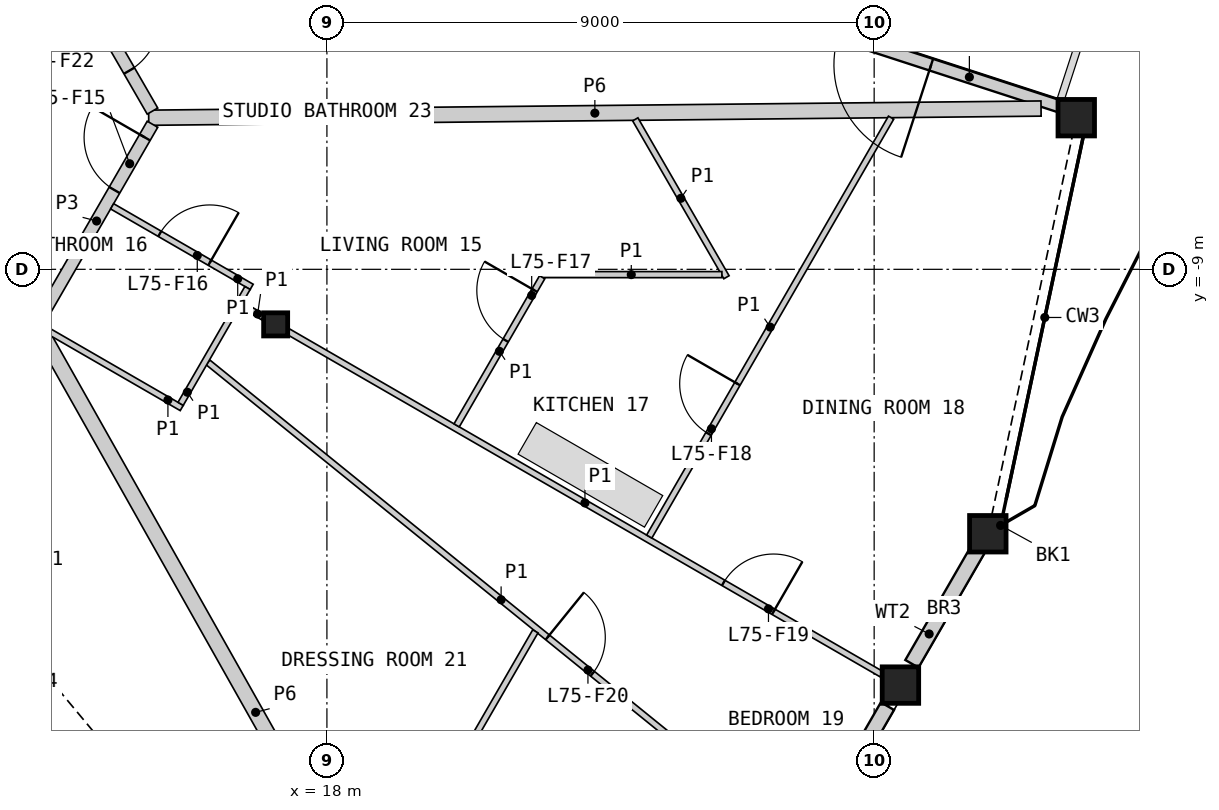
"""IFC4 building model, lengths in metres.
Left out: names, types, materials, properties, quantities, classifications, styles, units other than length and angle.
Written with IfcOpenShell. Run it as: python <this file> out.ifc"""

import sys

from ifc_helpers import new_model, si_unit, direction, frame, frame_2d, origin, origin_2d, place, context, subcontext, project, spatial, rectangle, hollow_rectangle, i_section, extrude, element, fill, save


model = new_model("IFC4")
c1 = context("Model", 3, precision=1e-05, world=origin(), true_north=direction((0.0, 1.0)))
c2 = subcontext(c1, "Body", "Model", "MODEL_VIEW")
j1 = project(units=[si_unit("LENGTHUNIT", "METRE"), si_unit("PLANEANGLEUNIT", "RADIAN")], contexts=[c1])
p1 = place(None, origin())
s1 = spatial("IfcSite", under=j1, at=p1, CompositionType="ELEMENT")
p2 = place(p1, origin())
s2 = spatial("IfcBuilding", under=s1, at=p2, CompositionType="ELEMENT")
p3 = place(p2, frame((0.0, 0.0, 335.8)))
s3 = spatial("IfcBuildingStorey", under=s2, at=p3, CompositionType="ELEMENT", Elevation=335.8)
for number, where, z_axis, x_axis in (
    (1, (27.432, -15.838, 0.0), (0.0, 0.0, 1.0), (1.0, 0.0, 0.0)),
    (2, (28.869, -13.349, 0.0), (0.0, 0.0, 1.0), (1.0, 0.0, 0.0)),
    (3, (30.324, -6.506, 0.0), (0.0, 0.0, 1.0), (1.0, 0.0, 0.0)),
):
    element("IfcColumn", number, at=place(p3, frame(where, z_axis=z_axis, x_axis=x_axis)), inside=s3, PredefinedType="COLUMN", context=c2, shape_type="SweptSolid", body=[
        extrude(hollow_rectangle(XDim=0.6, YDim=0.6, WallThickness=0.04, at=origin_2d()), origin(), (0.0, 0.0, 1.0), 3.4),
    ])
p4 = place(p3, frame((17.157, -9.906, 0.0), z_axis=(0.0, 0.0, 1.0), x_axis=(1.0, 0.0, 0.0)))
e4 = element("IfcColumn", 4, at=p4, inside=s3, PredefinedType="COLUMN", context=c2, shape_type="SweptSolid", body=[
    extrude(i_section(OverallWidth=0.396, OverallDepth=0.381, WebThickness=0.019, FlangeThickness=0.03, at=origin_2d()), origin(), (0.0, 0.0, 1.0), 3.4),
])
p5 = place(p3, frame((26.09, -18.139, 0.0), z_axis=(0.0, 0.0, 1.0), x_axis=(0.500046963369, 0.865998287773, 0.0)))
e5 = element("IfcWall", 5, at=p5, inside=s3, PredefinedType="SOLIDWALL", context=c2, shape_type="SweptSolid", body=[
    extrude(rectangle(XDim=2.258, YDim=0.25, at=frame_2d((1.129, 0.0))), origin(), (0.0, 0.0, 1.0), 2.488),
])
p6 = place(p5, frame((0.45, 0.0, 1.6)))
e6 = element("IfcOpeningElement", 6, at=p6, cuts=e5, PredefinedType="OPENING", context=c2, shape_type="SweptSolid", body=[
    extrude(rectangle(XDim=0.9, YDim=0.6, at=frame_2d((0.45, 0.3))), frame((0.0, 0.135, 0.0), z_axis=(0.0, -1.0, 0.0), x_axis=(1.0, 0.0, 0.0)), (0.0, 0.0, 1.0), 0.27),
])
p7 = place(p3, frame((27.621, -15.488, 0.0), z_axis=(0.0, 0.0, 1.0), x_axis=(0.49996174997, 0.866047486323, 0.0)))
e7 = element("IfcWall", 7, at=p7, inside=s3, PredefinedType="SOLIDWALL", context=c2, shape_type="SweptSolid", body=[
    extrude(rectangle(XDim=2.267, YDim=0.25, at=frame_2d((1.133, 0.0))), origin(), (0.0, 0.0, 1.0), 2.488),
])
p8 = place(p3, frame((30.09, -6.333, 0.0), z_axis=(0.0, 0.0, 1.0), x_axis=(-0.951048625867, 0.309041277561, 0.0)))
e8 = element("IfcWall", 8, at=p8, inside=s3, PredefinedType="SOLIDWALL", context=c2, shape_type="SweptSolid", body=[
    extrude(rectangle(XDim=6.408, YDim=0.2, at=frame_2d((3.204, 0.0))), origin(), (0.0, 0.0, 1.0), 2.488),
])
p9 = place(p8, frame((2.262, 0.0, 0.0)))
e9 = element("IfcOpeningElement", 9, at=p9, cuts=e8, PredefinedType="OPENING", context=c2, shape_type="SweptSolid", body=[
    extrude(rectangle(XDim=1.6, YDim=2.25, at=frame_2d((0.8, 1.125))), frame((0.0, 0.11, 0.0), z_axis=(0.0, -1.0, 0.0), x_axis=(1.0, 0.0, 0.0)), (0.0, 0.0, 1.0), 0.22),
])
p10 = place(p3, frame((15.069, -6.507, 0.0), z_axis=(0.0, 0.0, 1.0), x_axis=(0.999946985532, 0.010296898856, 0.0)))
e10 = element("IfcWall", 10, at=p10, inside=s3, PredefinedType="PARTITIONING", context=c2, shape_type="SweptSolid", body=[
    extrude(rectangle(XDim=14.677, YDim=0.25, at=frame_2d((7.338, 0.0))), origin(), (0.0, 0.0, 1.0), 2.33),
])
p11 = place(p3, frame((13.169, -9.797, 0.0), z_axis=(0.0, 0.0, 1.0), x_axis=(0.4910591841, -0.871126212274, 0.0)))
e11 = element("IfcWall", 11, at=p11, inside=s3, PredefinedType="PARTITIONING", context=c2, shape_type="SweptSolid", body=[
    extrude(rectangle(XDim=14.9, YDim=0.25, at=frame_2d((7.45, 0.0))), origin(), (0.0, 0.0, 1.0), 2.33),
])
p12 = place(p3, frame((12.988, -2.684, 0.0), z_axis=(0.0, 0.0, 1.0), x_axis=(0.500003406062, -0.866023437285, 0.0)))
e12 = element("IfcWall", 12, at=p12, inside=s3, PredefinedType="PARTITIONING", context=c2, shape_type="SweptSolid", body=[
    extrude(rectangle(XDim=4.288, YDim=0.2, at=frame_2d((2.144, 0.0))), origin(), (0.0, 0.0, 1.0), 3.1),
])
p13 = place(p12, frame((2.521, 0.0, 0.0)))
e13 = element("IfcOpeningElement", 13, at=p13, cuts=e12, PredefinedType="OPENING", context=c2, shape_type="SweptSolid", body=[
    extrude(rectangle(XDim=1.0, YDim=2.1, at=frame_2d((0.5, 1.05))), frame((0.0, 0.11, 0.0), z_axis=(0.0, -1.0, 0.0), x_axis=(1.0, 0.0, 0.0)), (0.0, 0.0, 1.0), 0.22),
])
p14 = place(p3, frame((13.293, -9.797, 0.0), z_axis=(0.0, 0.0, 1.0), x_axis=(0.499967746641, 0.866044024469, 0.0)))
e14 = element("IfcWall", 14, at=p14, inside=s3, PredefinedType="PARTITIONING", context=c2, shape_type="SweptSolid", body=[
    extrude(rectangle(XDim=3.676, YDim=0.2, at=frame_2d((1.838, 0.0))), origin(), (0.0, 0.0, 1.0), 3.1),
])
p15 = place(p14, frame((2.426, 0.0, 0.0)))
e15 = element("IfcOpeningElement", 15, at=p15, cuts=e14, PredefinedType="OPENING", context=c2, shape_type="SweptSolid", body=[
    extrude(rectangle(XDim=1.0, YDim=2.1, at=frame_2d((0.5, 1.05))), frame((0.0, 0.11, 0.0), z_axis=(0.0, -1.0, 0.0), x_axis=(1.0, 0.0, 0.0)), (0.0, 0.0, 1.0), 0.22),
])
p16 = place(p3, frame((16.044, -10.531, 0.0), z_axis=(0.0, 0.0, 1.0), x_axis=(0.777141742697, -0.629325600749, 0.0)))
e16 = element("IfcWall", 16, at=p16, inside=s3, PredefinedType="PARTITIONING", context=c2, shape_type="SweptSolid", body=[
    extrude(rectangle(XDim=12.406, YDim=0.1, at=frame_2d((6.203, 0.0))), origin(), (0.0, 0.0, 1.0), 2.33),
])
p17 = place(p16, frame((7.185, 0.0, 0.0)))
e17 = element("IfcOpeningElement", 17, at=p17, cuts=e16, PredefinedType="OPENING", context=c2, shape_type="SweptSolid", body=[
    extrude(rectangle(XDim=0.95, YDim=2.1, at=frame_2d((0.475, 1.05))), frame((0.0, 0.06, 0.0), z_axis=(0.0, -1.0, 0.0), x_axis=(1.0, 0.0, 0.0)), (0.0, 0.0, 1.0), 0.12),
])
p18 = place(p3, frame((17.365, -10.025, 0.0), z_axis=(0.0, 0.0, 1.0), x_axis=(0.866021046153, -0.500007547564, 0.0)))
e18 = element("IfcWall", 18, at=p18, inside=s3, PredefinedType="PARTITIONING", context=c2, shape_type="SweptSolid", body=[
    extrude(rectangle(XDim=11.267, YDim=0.1, at=frame_2d((5.634, 0.0))), origin(), (0.0, 0.0, 1.0), 2.33),
])
p19 = place(p18, frame((8.264, 0.0, 0.0)))
e19 = element("IfcOpeningElement", 19, at=p19, cuts=e18, PredefinedType="OPENING", context=c2, shape_type="SweptSolid", body=[
    extrude(rectangle(XDim=0.95, YDim=2.1, at=frame_2d((0.475, 1.05))), frame((0.0, 0.06, 0.0), z_axis=(0.0, -1.0, 0.0), x_axis=(1.0, 0.0, 0.0)), (0.0, 0.0, 1.0), 0.12),
])
p20 = place(p3, frame((23.301, -13.395, 0.0), z_axis=(0.0, 0.0, 1.0), x_axis=(0.500017325895, 0.866015400443, 0.0)))
e20 = element("IfcWall", 20, at=p20, inside=s3, PredefinedType="PARTITIONING", context=c2, shape_type="SweptSolid", body=[
    extrude(rectangle(XDim=7.955, YDim=0.1, at=frame_2d((3.978, 0.0))), origin(), (0.0, 0.0, 1.0), 2.33),
])
p21 = place(p20, frame((1.951, 0.0, 0.0)))
e21 = element("IfcOpeningElement", 21, at=p21, cuts=e20, PredefinedType="OPENING", context=c2, shape_type="SweptSolid", body=[
    extrude(rectangle(XDim=0.95, YDim=2.1, at=frame_2d((0.475, 1.05))), frame((0.0, 0.06, 0.0), z_axis=(0.0, -1.0, 0.0), x_axis=(1.0, 0.0, 0.0)), (0.0, 0.0, 1.0), 0.12),
])
p22 = place(p3, frame((18.787, -19.529, 0.0), z_axis=(0.0, 0.0, 1.0), x_axis=(0.499986503906, 0.866033195618, 0.0)))
e22 = element("IfcWall", 22, at=p22, inside=s3, PredefinedType="PARTITIONING", context=c2, shape_type="SweptSolid", body=[
    extrude(rectangle(XDim=5.282, YDim=0.1, at=frame_2d((2.641, 0.0))), origin(), (0.0, 0.0, 1.0), 2.33),
])
p23 = place(p22, frame((1.662, 0.0, 0.0)))
e23 = element("IfcOpeningElement", 23, at=p23, cuts=e22, PredefinedType="OPENING", context=c2, shape_type="SweptSolid", body=[
    extrude(rectangle(XDim=0.95, YDim=2.1, at=frame_2d((0.475, 1.05))), frame((0.0, 0.06, 0.0), z_axis=(0.0, -1.0, 0.0), x_axis=(1.0, 0.0, 0.0)), (0.0, 0.0, 1.0), 0.12),
])
p24 = place(p3, frame((23.072, -6.533, 0.0), z_axis=(0.0, 0.0, 1.0), x_axis=(0.500009026289, -0.866020192391, 0.0)))
e24 = element("IfcWall", 24, at=p24, inside=s3, PredefinedType="PARTITIONING", context=c2, shape_type="SweptSolid", body=[
    extrude(rectangle(XDim=2.999, YDim=0.1, at=frame_2d((1.5, 0.0))), origin(), (0.0, 0.0, 1.0), 2.33),
])
p25 = place(p3, frame((21.515, -9.087, 0.0), z_axis=(0.0, 0.0, 1.0), x_axis=(1.0, 0.0, 0.0)))
e25 = element("IfcWall", 25, at=p25, inside=s3, PredefinedType="PARTITIONING", context=c2, shape_type="SweptSolid", body=[
    extrude(rectangle(XDim=2.981, YDim=0.1, at=frame_2d((1.49, 0.0))), origin(), (0.0, 0.0, 1.0), 2.33),
])
p26 = place(p3, frame((20.134, -11.566, 0.0), z_axis=(0.0, 0.0, 1.0), x_axis=(0.499947857008, 0.866055506462, 0.0)))
e26 = element("IfcWall", 26, at=p26, inside=s3, PredefinedType="PARTITIONING", context=c2, shape_type="SweptSolid", body=[
    extrude(rectangle(XDim=2.813, YDim=0.1, at=frame_2d((1.406, 0.0))), origin(), (0.0, 0.0, 1.0), 2.33),
])
p27 = place(p26, frame((1.613, 0.0, 0.0)))
e27 = element("IfcOpeningElement", 27, at=p27, cuts=e26, PredefinedType="OPENING", context=c2, shape_type="SweptSolid", body=[
    extrude(rectangle(XDim=0.95, YDim=2.1, at=frame_2d((0.475, 1.05))), frame((0.0, 0.06, 0.0), z_axis=(0.0, -1.0, 0.0), x_axis=(1.0, 0.0, 0.0)), (0.0, 0.0, 1.0), 0.12),
])
p28 = place(p3, frame((14.468, -7.964, 0.0), z_axis=(0.0, 0.0, 1.0), x_axis=(0.865989200783, -0.500062700197, 0.0)))
e28 = element("IfcWall", 28, at=p28, inside=s3, PredefinedType="PARTITIONING", context=c2, shape_type="SweptSolid", body=[
    extrude(rectangle(XDim=2.65, YDim=0.1, at=frame_2d((1.325, 0.0))), origin(), (0.0, 0.0, 1.0), 2.33),
])
p29 = place(p28, frame((0.905, 0.0, 0.0)))
e29 = element("IfcOpeningElement", 29, at=p29, cuts=e28, PredefinedType="OPENING", context=c2, shape_type="SweptSolid", body=[
    extrude(rectangle(XDim=0.95, YDim=2.1, at=frame_2d((0.475, 1.05))), frame((0.0, 0.06, 0.0), z_axis=(0.0, -1.0, 0.0), x_axis=(1.0, 0.0, 0.0)), (0.0, 0.0, 1.0), 0.12),
])
p30 = place(p3, frame((13.339, -9.968, 0.0), z_axis=(0.0, 0.0, 1.0), x_axis=(0.866036909293, -0.499980071345, 0.0)))
e30 = element("IfcWall", 30, at=p30, inside=s3, PredefinedType="PARTITIONING", context=c2, shape_type="SweptSolid", body=[
    extrude(rectangle(XDim=2.625, YDim=0.1, at=frame_2d((1.312, 0.0))), origin(), (0.0, 0.0, 1.0), 2.33),
])
p31 = place(p3, frame((15.594, -11.212, 0.0), z_axis=(0.0, 0.0, 1.0), x_axis=(0.499898558967, 0.866083962871, 0.0)))
e31 = element("IfcWall", 31, at=p31, inside=s3, PredefinedType="PARTITIONING", context=c2, shape_type="SweptSolid", body=[
    extrude(rectangle(XDim=2.2, YDim=0.1, at=frame_2d((1.1, 0.0))), origin(), (0.0, 0.0, 1.0), 2.33),
])
p32 = place(p3, frame((16.594, -9.581, 0.0), z_axis=(0.0, 0.0, 1.0), x_axis=(0.866036909293, -0.499980071345, 0.0)))
e32 = element("IfcWall", 32, at=p32, inside=s3, PredefinedType="PARTITIONING", context=c2, shape_type="SweptSolid", body=[
    extrude(rectangle(XDim=0.41, YDim=0.1, at=frame_2d((0.205, 0.0))), origin(), (0.0, 0.0, 1.0), 2.33),
])
p33 = place(p9, origin())
e33 = element("IfcDoor", 33, at=p33, inside=s3, OperationType="DOUBLE_DOOR_SINGLE_SWING", PredefinedType="DOOR", context=c2, shape_type="SweptSolid", body=[
    extrude(rectangle(XDim=1.6, YDim=2.25, at=frame_2d((0.8, 1.125))), frame((0.0, 0.025, 0.0), z_axis=(0.0, -1.0, 0.0), x_axis=(1.0, 0.0, 0.0)), (0.0, 0.0, 1.0), 0.05),
])
fill(e9, e33)
p34 = place(p15, origin())
e34 = element("IfcDoor", 34, at=p34, inside=s3, OperationType="SINGLE_SWING_RIGHT", PredefinedType="DOOR", context=c2, shape_type="SweptSolid", body=[
    extrude(rectangle(XDim=1.0, YDim=2.1, at=frame_2d((0.5, 1.05))), frame((0.0, 0.025, 0.0), z_axis=(0.0, -1.0, 0.0), x_axis=(1.0, 0.0, 0.0)), (0.0, 0.0, 1.0), 0.05),
])
fill(e15, e34)
p35 = place(p29, origin())
e35 = element("IfcDoor", 35, at=p35, inside=s3, OperationType="SINGLE_SWING_RIGHT", PredefinedType="DOOR", context=c2, shape_type="SweptSolid", body=[
    extrude(rectangle(XDim=0.95, YDim=2.1, at=frame_2d((0.475, 1.05))), frame((0.0, 0.025, 0.0), z_axis=(0.0, -1.0, 0.0), x_axis=(1.0, 0.0, 0.0)), (0.0, 0.0, 1.0), 0.05),
])
fill(e29, e35)
p36 = place(p27, origin())
e36 = element("IfcDoor", 36, at=p36, inside=s3, OperationType="SINGLE_SWING_RIGHT", PredefinedType="DOOR", context=c2, shape_type="SweptSolid", body=[
    extrude(rectangle(XDim=0.95, YDim=2.1, at=frame_2d((0.475, 1.05))), frame((0.0, 0.025, 0.0), z_axis=(0.0, -1.0, 0.0), x_axis=(1.0, 0.0, 0.0)), (0.0, 0.0, 1.0), 0.05),
])
fill(e27, e36)
p37 = place(p21, origin())
e37 = element("IfcDoor", 37, at=p37, inside=s3, OperationType="SINGLE_SWING_RIGHT", PredefinedType="DOOR", context=c2, shape_type="SweptSolid", body=[
    extrude(rectangle(XDim=0.95, YDim=2.1, at=frame_2d((0.475, 1.05))), frame((0.0, 0.025, 0.0), z_axis=(0.0, -1.0, 0.0), x_axis=(1.0, 0.0, 0.0)), (0.0, 0.0, 1.0), 0.05),
])
fill(e21, e37)
p38 = place(p19, origin())
e38 = element("IfcDoor", 38, at=p38, inside=s3, OperationType="SINGLE_SWING_RIGHT", PredefinedType="DOOR", context=c2, shape_type="SweptSolid", body=[
    extrude(rectangle(XDim=0.95, YDim=2.1, at=frame_2d((0.475, 1.05))), frame((0.0, 0.025, 0.0), z_axis=(0.0, -1.0, 0.0), x_axis=(1.0, 0.0, 0.0)), (0.0, 0.0, 1.0), 0.05),
])
fill(e19, e38)
p39 = place(p17, origin())
e39 = element("IfcDoor", 39, at=p39, inside=s3, OperationType="SINGLE_SWING_LEFT", PredefinedType="DOOR", context=c2, shape_type="SweptSolid", body=[
    extrude(rectangle(XDim=0.95, YDim=2.1, at=frame_2d((0.475, 1.05))), frame((0.0, 0.025, 0.0), z_axis=(0.0, -1.0, 0.0), x_axis=(1.0, 0.0, 0.0)), (0.0, 0.0, 1.0), 0.05),
])
fill(e17, e39)
p40 = place(p13, origin())
e40 = element("IfcDoor", 40, at=p40, inside=s3, OperationType="SINGLE_SWING_LEFT", PredefinedType="DOOR", context=c2, shape_type="SweptSolid", body=[
    extrude(rectangle(XDim=1.0, YDim=2.1, at=frame_2d((0.5, 1.05))), frame((0.0, 0.025, 0.0), z_axis=(0.0, -1.0, 0.0), x_axis=(1.0, 0.0, 0.0)), (0.0, 0.0, 1.0), 0.05),
])
fill(e13, e40)
save(model, sys.argv[1])
